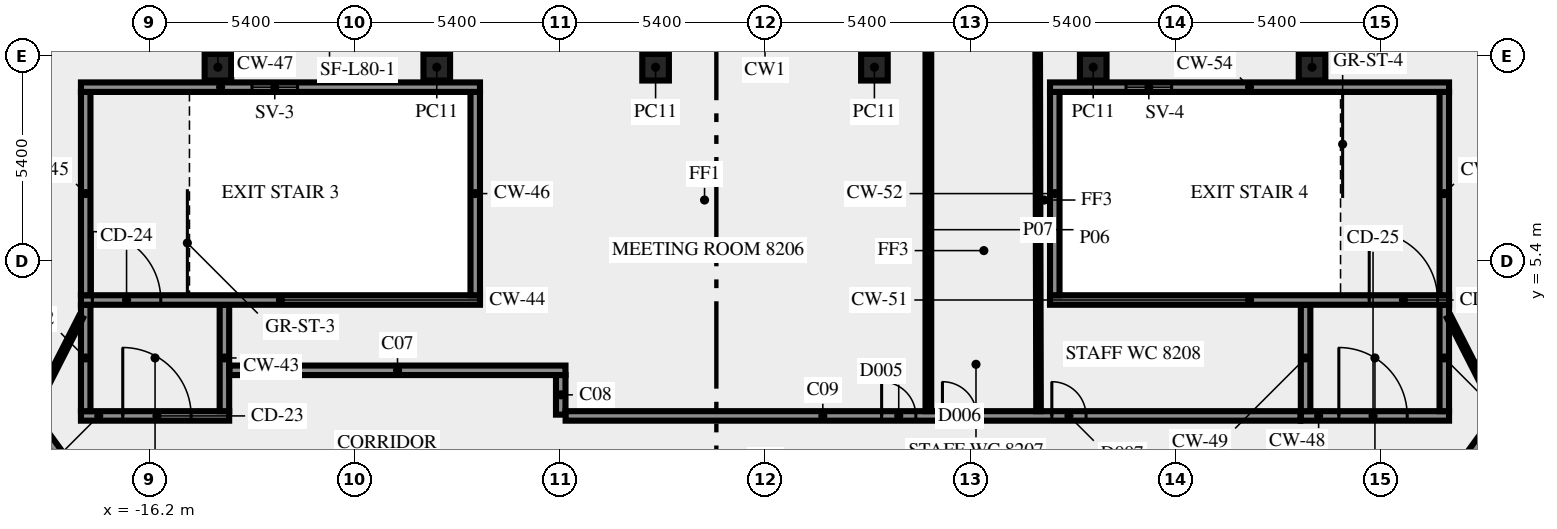
"""IFC4 building model, lengths in metres.
Left out: names, types, materials, properties, quantities, classifications, styles, units other than length and angle.
Written with IfcOpenShell. Run it as: python <this file> out.ifc"""

import sys

from ifc_helpers import new_model, si_unit, direction, frame, frame_2d, origin, origin_2d, place, context, subcontext, project, spatial, rectangle, extrude, element, fill, save


model = new_model("IFC4")
c1 = context("Model", 3, precision=1e-05, world=origin(), true_north=direction((0.0, 1.0)))
c2 = subcontext(c1, "Body", "Model", "MODEL_VIEW")
j1 = project(units=[si_unit("LENGTHUNIT", "METRE"), si_unit("PLANEANGLEUNIT", "RADIAN")], contexts=[c1])
p1 = place(None, origin())
s1 = spatial("IfcSite", under=j1, at=p1, CompositionType="ELEMENT")
p2 = place(p1, origin())
s2 = spatial("IfcBuilding", under=s1, at=p2, CompositionType="ELEMENT")
p3 = place(p2, frame((0.0, 0.0, 351.0)))
s3 = spatial("IfcBuildingStorey", under=s2, at=p3, CompositionType="ELEMENT", Elevation=351.0)
for number, where, z_axis, x_axis in (
    (1, (14.395, 10.5, 0.0), (0.0, 0.0, 1.0), (-1.0, 0.0, 0.0)),
    (2, (8.637, 10.5, 0.0), (0.0, 0.0, 1.0), (-1.0, 0.0, 0.0)),
    (3, (2.879, 10.5, 0.0), (0.0, 0.0, 1.0), (-1.0, 0.0, 0.0)),
    (4, (-2.879, 10.5, 0.0), (0.0, 0.0, 1.0), (-1.0, 0.0, 0.0)),
    (5, (-8.637, 10.5, 0.0), (0.0, 0.0, 1.0), (-1.0, 0.0, 0.0)),
    (6, (-14.395, 10.5, 0.0), (0.0, 0.0, 1.0), (-1.0, 0.0, 0.0)),
):
    element("IfcColumn", number, at=place(p3, frame(where, z_axis=z_axis, x_axis=x_axis)), inside=s3, PredefinedType="COLUMN", context=c2, shape_type="SweptSolid", body=[
        extrude(rectangle(XDim=0.7, YDim=0.7, at=origin_2d()), origin(), (0.0, 0.0, 1.0), 3.2),
    ])
p4 = place(p3, frame((-18.0, 1.325, 0.0), z_axis=(0.0, 0.0, 1.0), x_axis=(1.0, 0.0, 0.0)))
e7 = element("IfcWall", 7, at=p4, inside=s3, PredefinedType="SHEAR", context=c2, shape_type="SweptSolid", body=[
    extrude(rectangle(XDim=3.9, YDim=0.25, at=frame_2d((1.95, 0.0))), origin(), (0.0, 0.0, 1.0), 3.2),
])
p5 = place(p4, frame((1.1, 0.0, 0.0)))
e8 = element("IfcOpeningElement", 8, at=p5, cuts=e7, PredefinedType="OPENING", context=c2, shape_type="SweptSolid", body=[
    extrude(rectangle(XDim=1.8, YDim=2.1, at=frame_2d((0.9, 1.05))), frame((0.0, 0.135, 0.0), z_axis=(0.0, -1.0, 0.0), x_axis=(1.0, 0.0, 0.0)), (0.0, 0.0, 1.0), 0.27),
])
for number, where, z_axis, x_axis in (
    (9, (-17.875, 1.45, 0.0), (0.0, 0.0, 1.0), (0.0, 1.0, 0.0)),
    (10, (-14.225, 1.45, 0.0), (0.0, 0.0, 1.0), (0.0, 1.0, 0.0)),
):
    element("IfcWall", number, at=place(p3, frame(where, z_axis=z_axis, x_axis=x_axis)), inside=s3, PredefinedType="SHEAR", context=c2, shape_type="SweptSolid", body=[
        extrude(rectangle(XDim=2.8, YDim=0.25, at=frame_2d((1.4, 0.0))), origin(), (0.0, 0.0, 1.0), 3.2),
    ])
p6 = place(p3, frame((-18.0, 4.375, 0.0), z_axis=(0.0, 0.0, 1.0), x_axis=(1.0, 0.0, 0.0)))
e11 = element("IfcWall", 11, at=p6, inside=s3, PredefinedType="SHEAR", context=c2, shape_type="SweptSolid", body=[
    extrude(rectangle(XDim=10.5, YDim=0.25, at=frame_2d((5.25, 0.0))), origin(), (0.0, 0.0, 1.0), 3.2),
])
p7 = place(p6, frame((0.3, 0.0, 0.0)))
e12 = element("IfcOpeningElement", 12, at=p7, cuts=e11, PredefinedType="OPENING", context=c2, shape_type="SweptSolid", body=[
    extrude(rectangle(XDim=1.8, YDim=2.1, at=frame_2d((0.9, 1.05))), frame((0.0, 0.135, 0.0), z_axis=(0.0, -1.0, 0.0), x_axis=(1.0, 0.0, 0.0)), (0.0, 0.0, 1.0), 0.27),
])
for number, where, z_axis, x_axis in (
    (13, (-17.875, 4.5, 0.0), (0.0, 0.0, 1.0), (0.0, 1.0, 0.0)),
    (14, (-7.625, 4.5, 0.0), (0.0, 0.0, 1.0), (0.0, 1.0, 0.0)),
):
    element("IfcWall", number, at=place(p3, frame(where, z_axis=z_axis, x_axis=x_axis)), inside=s3, PredefinedType="SHEAR", context=c2, shape_type="SweptSolid", body=[
        extrude(rectangle(XDim=5.35, YDim=0.25, at=frame_2d((2.675, 0.0))), origin(), (0.0, 0.0, 1.0), 3.2),
    ])
p8 = place(p3, frame((-18.0, 9.975, 0.0), z_axis=(0.0, 0.0, 1.0), x_axis=(1.0, 0.0, 0.0)))
e15 = element("IfcWall", 15, at=p8, inside=s3, PredefinedType="SHEAR", context=c2, shape_type="SweptSolid", body=[
    extrude(rectangle(XDim=10.5, YDim=0.25, at=frame_2d((5.25, 0.0))), origin(), (0.0, 0.0, 1.0), 3.2),
])
p9 = place(p8, frame((4.5, 0.0, 1.0)))
e16 = element("IfcOpeningElement", 16, at=p9, cuts=e15, PredefinedType="OPENING", context=c2, shape_type="SweptSolid", body=[
    extrude(rectangle(XDim=1.2, YDim=1.2, at=frame_2d((0.6, 0.6))), frame((0.0, 0.135, 0.0), z_axis=(0.0, -1.0, 0.0), x_axis=(1.0, 0.0, 0.0)), (0.0, 0.0, 1.0), 0.27),
])
p10 = place(p3, frame((14.1, 1.325, 0.0), z_axis=(0.0, 0.0, 1.0), x_axis=(1.0, 0.0, 0.0)))
e17 = element("IfcWall", 17, at=p10, inside=s3, PredefinedType="SHEAR", context=c2, shape_type="SweptSolid", body=[
    extrude(rectangle(XDim=3.9, YDim=0.25, at=frame_2d((1.95, 0.0))), origin(), (0.0, 0.0, 1.0), 3.2),
])
p11 = place(p10, frame((1.0, 0.0, 0.0)))
e18 = element("IfcOpeningElement", 18, at=p11, cuts=e17, PredefinedType="OPENING", context=c2, shape_type="SweptSolid", body=[
    extrude(rectangle(XDim=1.8, YDim=2.1, at=frame_2d((0.9, 1.05))), frame((0.0, 0.135, 0.0), z_axis=(0.0, -1.0, 0.0), x_axis=(1.0, 0.0, 0.0)), (0.0, 0.0, 1.0), 0.27),
])
for number, where, z_axis, x_axis in (
    (19, (14.225, 1.45, 0.0), (0.0, 0.0, 1.0), (0.0, 1.0, 0.0)),
    (20, (17.875, 1.45, 0.0), (0.0, 0.0, 1.0), (0.0, 1.0, 0.0)),
):
    element("IfcWall", number, at=place(p3, frame(where, z_axis=z_axis, x_axis=x_axis)), inside=s3, PredefinedType="SHEAR", context=c2, shape_type="SweptSolid", body=[
        extrude(rectangle(XDim=2.8, YDim=0.25, at=frame_2d((1.4, 0.0))), origin(), (0.0, 0.0, 1.0), 3.2),
    ])
p12 = place(p3, frame((7.5, 4.375, 0.0), z_axis=(0.0, 0.0, 1.0), x_axis=(1.0, 0.0, 0.0)))
e21 = element("IfcWall", 21, at=p12, inside=s3, PredefinedType="SHEAR", context=c2, shape_type="SweptSolid", body=[
    extrude(rectangle(XDim=10.5, YDim=0.25, at=frame_2d((5.25, 0.0))), origin(), (0.0, 0.0, 1.0), 3.2),
])
p13 = place(p12, frame((8.4, 0.0, 0.0)))
e22 = element("IfcOpeningElement", 22, at=p13, cuts=e21, PredefinedType="OPENING", context=c2, shape_type="SweptSolid", body=[
    extrude(rectangle(XDim=1.8, YDim=2.1, at=frame_2d((0.9, 1.05))), frame((0.0, 0.135, 0.0), z_axis=(0.0, -1.0, 0.0), x_axis=(1.0, 0.0, 0.0)), (0.0, 0.0, 1.0), 0.27),
])
for number, where, z_axis, x_axis in (
    (23, (7.625, 4.5, 0.0), (0.0, 0.0, 1.0), (0.0, 1.0, 0.0)),
    (24, (17.875, 4.5, 0.0), (0.0, 0.0, 1.0), (0.0, 1.0, 0.0)),
):
    element("IfcWall", number, at=place(p3, frame(where, z_axis=z_axis, x_axis=x_axis)), inside=s3, PredefinedType="SHEAR", context=c2, shape_type="SweptSolid", body=[
        extrude(rectangle(XDim=5.35, YDim=0.25, at=frame_2d((2.675, 0.0))), origin(), (0.0, 0.0, 1.0), 3.2),
    ])
p14 = place(p3, frame((7.5, 9.975, 0.0), z_axis=(0.0, 0.0, 1.0), x_axis=(1.0, 0.0, 0.0)))
e25 = element("IfcWall", 25, at=p14, inside=s3, PredefinedType="SHEAR", context=c2, shape_type="SweptSolid", body=[
    extrude(rectangle(XDim=10.5, YDim=0.25, at=frame_2d((5.25, 0.0))), origin(), (0.0, 0.0, 1.0), 3.2),
])
p15 = place(p14, frame((2.0, 0.0, 1.0)))
e26 = element("IfcOpeningElement", 26, at=p15, cuts=e25, PredefinedType="OPENING", context=c2, shape_type="SweptSolid", body=[
    extrude(rectangle(XDim=1.2, YDim=1.2, at=frame_2d((0.6, 0.6))), frame((0.0, 0.135, 0.0), z_axis=(0.0, -1.0, 0.0), x_axis=(1.0, 0.0, 0.0)), (0.0, 0.0, 1.0), 0.27),
])
p16 = place(p3, frame((17.545, -1.125, 0.0), z_axis=(0.0, 0.0, 1.0), x_axis=(0.58779555165, 0.809009511354, 0.0)))
e27 = element("IfcWall", 27, at=p16, inside=s3, PredefinedType="SOLIDWALL", context=c2, shape_type="SweptSolid", body=[
    extrude(rectangle(XDim=18.103, YDim=0.25, at=frame_2d((9.052, 0.0))), origin(), (0.0, 0.0, 1.0), 3.2),
])
p17 = place(p16, frame((16.728, 0.0, 0.0)))
e28 = element("IfcOpeningElement", 28, at=p17, cuts=e27, PredefinedType="OPENING", context=c2, shape_type="SweptSolid", body=[
    extrude(rectangle(XDim=0.9, YDim=2.1, at=frame_2d((0.45, 1.05))), frame((0.0, 0.135, 0.0), z_axis=(0.0, -1.0, 0.0), x_axis=(1.0, 0.0, 0.0)), (0.0, 0.0, 1.0), 0.27),
])
p18 = place(p3, frame((-28.039, 13.319, 0.0), z_axis=(0.0, 0.0, 1.0), x_axis=(0.587791911753, -0.809012155952, 0.0)))
e29 = element("IfcWall", 29, at=p18, inside=s3, PredefinedType="SOLIDWALL", context=c2, shape_type="SweptSolid", body=[
    extrude(rectangle(XDim=17.853, YDim=0.25, at=frame_2d((8.927, 0.0))), origin(), (0.0, 0.0, 1.0), 3.2),
])
p19 = place(p18, frame((13.512, 0.0, 0.0)))
e30 = element("IfcOpeningElement", 30, at=p19, cuts=e29, PredefinedType="OPENING", context=c2, shape_type="SweptSolid", body=[
    extrude(rectangle(XDim=0.9, YDim=2.1, at=frame_2d((0.45, 1.05))), frame((0.0, 0.135, 0.0), z_axis=(0.0, -1.0, 0.0), x_axis=(1.0, 0.0, 0.0)), (0.0, 0.0, 1.0), 0.27),
])
p20 = place(p3, frame((-14.09, 2.525, 0.0), z_axis=(0.0, 0.0, 1.0), x_axis=(1.0, 0.0, 0.0)))
e31 = element("IfcWall", 31, at=p20, inside=s3, PredefinedType="SOLIDWALL", context=c2, shape_type="SweptSolid", body=[
    extrude(rectangle(XDim=8.84, YDim=0.25, at=frame_2d((4.42, 0.0))), origin(), (0.0, 0.0, 1.0), 3.2),
])
p21 = place(p3, frame((-5.375, 2.4, 0.0), z_axis=(0.0, 0.0, 1.0), x_axis=(0.0, -1.0, 0.0)))
e32 = element("IfcWall", 32, at=p21, inside=s3, PredefinedType="SOLIDWALL", context=c2, shape_type="SweptSolid", body=[
    extrude(rectangle(XDim=1.041, YDim=0.25, at=frame_2d((0.521, 0.0))), origin(), (0.0, 0.0, 1.0), 3.2),
])
p22 = place(p3, frame((-5.246, 1.325, 0.0), z_axis=(0.0, 0.0, 1.0), x_axis=(1.0, 0.0, 0.0)))
e33 = element("IfcWall", 33, at=p22, inside=s3, PredefinedType="SOLIDWALL", context=c2, shape_type="SweptSolid", body=[
    extrude(rectangle(XDim=19.336, YDim=0.25, at=frame_2d((9.668, 0.0))), origin(), (0.0, 0.0, 1.0), 3.2),
])
p23 = place(p22, frame((8.315, 0.0, 0.0)))
e34 = element("IfcOpeningElement", 34, at=p23, cuts=e33, PredefinedType="OPENING", context=c2, shape_type="SweptSolid", body=[
    extrude(rectangle(XDim=0.9, YDim=2.1, at=frame_2d((0.45, 1.05))), frame((0.0, 0.135, 0.0), z_axis=(0.0, -1.0, 0.0), x_axis=(1.0, 0.0, 0.0)), (0.0, 0.0, 1.0), 0.27),
])
p24 = place(p22, frame((9.915, 0.0, 0.0)))
e35 = element("IfcOpeningElement", 35, at=p24, cuts=e33, PredefinedType="OPENING", context=c2, shape_type="SweptSolid", body=[
    extrude(rectangle(XDim=0.9, YDim=2.1, at=frame_2d((0.45, 1.05))), frame((0.0, 0.135, 0.0), z_axis=(0.0, -1.0, 0.0), x_axis=(1.0, 0.0, 0.0)), (0.0, 0.0, 1.0), 0.27),
])
p25 = place(p22, frame((12.794, 0.0, 0.0)))
e36 = element("IfcOpeningElement", 36, at=p25, cuts=e33, PredefinedType="OPENING", context=c2, shape_type="SweptSolid", body=[
    extrude(rectangle(XDim=0.9, YDim=2.1, at=frame_2d((0.45, 1.05))), frame((0.0, 0.135, 0.0), z_axis=(0.0, -1.0, 0.0), x_axis=(1.0, 0.0, 0.0)), (0.0, 0.0, 1.0), 0.27),
])
p26 = place(p3, frame((4.299, 1.45, 0.0), z_axis=(0.0, 0.0, 1.0), x_axis=(0.0, 1.0, 0.0)))
e37 = element("IfcWall", 37, at=p26, inside=s3, PredefinedType="PARTITIONING", context=c2, shape_type="SweptSolid", body=[
    extrude(rectangle(XDim=9.55, YDim=0.15, at=frame_2d((4.775, 0.0))), origin(), (0.0, 0.0, 1.0), 2.5),
])
p27 = place(p3, frame((7.198, 1.45, 0.0), z_axis=(0.0, 0.0, 1.0), x_axis=(-0.002377476217, 0.999997173799, 0.0)))
e38 = element("IfcWall", 38, at=p27, inside=s3, PredefinedType="PARTITIONING", context=c2, shape_type="SweptSolid", body=[
    extrude(rectangle(XDim=9.55, YDim=0.12, at=frame_2d((4.775, 0.0))), origin(), (0.0, 0.0, 1.0), 2.5),
])
for number, where, z_axis, x_axis in (
    (39, (18.0, 3.925, 0.0), (0.0, 0.0, 1.0), (0.454, -0.891, 0.0)),
    (40, (-19.261, 1.45, 0.0), (0.0, 0.0, 1.0), (0.454, 0.891, 0.0)),
):
    element("IfcWall", number, at=place(p3, frame(where, z_axis=z_axis, x_axis=x_axis)), inside=s3, PredefinedType="PARTITIONING", context=c2, shape_type="SweptSolid", body=[
        extrude(rectangle(XDim=2.778, YDim=0.12, at=frame_2d((1.389, 0.0))), origin(), (0.0, 0.0, 1.0), 3.2),
    ])
p28 = place(p5, origin())
e41 = element("IfcDoor", 41, at=p28, inside=s3, OperationType="DOUBLE_DOOR_SINGLE_SWING", PredefinedType="DOOR", context=c2, shape_type="SweptSolid", body=[
    extrude(rectangle(XDim=1.8, YDim=2.1, at=frame_2d((0.9, 1.05))), frame((0.0, 0.025, 0.0), z_axis=(0.0, -1.0, 0.0), x_axis=(1.0, 0.0, 0.0)), (0.0, 0.0, 1.0), 0.05),
])
fill(e8, e41)
p29 = place(p7, origin())
e42 = element("IfcDoor", 42, at=p29, inside=s3, OperationType="DOUBLE_DOOR_SINGLE_SWING", PredefinedType="DOOR", context=c2, shape_type="SweptSolid", body=[
    extrude(rectangle(XDim=1.8, YDim=2.1, at=frame_2d((0.9, 1.05))), frame((0.0, 0.025, 0.0), z_axis=(0.0, -1.0, 0.0), x_axis=(1.0, 0.0, 0.0)), (0.0, 0.0, 1.0), 0.05),
])
fill(e12, e42)
p30 = place(p9, origin())
e43 = element("IfcWindow", 43, at=p30, inside=s3, PartitioningType="SINGLE_PANEL", PredefinedType="WINDOW", context=c2, shape_type="SweptSolid", body=[
    extrude(rectangle(XDim=1.2, YDim=1.2, at=frame_2d((0.6, 0.6))), frame((0.0, 0.03, 0.0), z_axis=(0.0, -1.0, 0.0), x_axis=(1.0, 0.0, 0.0)), (0.0, 0.0, 1.0), 0.06),
])
fill(e16, e43)
p31 = place(p11, origin())
e44 = element("IfcDoor", 44, at=p31, inside=s3, OperationType="DOUBLE_DOOR_SINGLE_SWING", PredefinedType="DOOR", context=c2, shape_type="SweptSolid", body=[
    extrude(rectangle(XDim=1.8, YDim=2.1, at=frame_2d((0.9, 1.05))), frame((0.0, 0.025, 0.0), z_axis=(0.0, -1.0, 0.0), x_axis=(1.0, 0.0, 0.0)), (0.0, 0.0, 1.0), 0.05),
])
fill(e18, e44)
p32 = place(p13, origin())
e45 = element("IfcDoor", 45, at=p32, inside=s3, OperationType="DOUBLE_DOOR_SINGLE_SWING", PredefinedType="DOOR", context=c2, shape_type="SweptSolid", body=[
    extrude(rectangle(XDim=1.8, YDim=2.1, at=frame_2d((0.9, 1.05))), frame((0.0, 0.025, 0.0), z_axis=(0.0, -1.0, 0.0), x_axis=(1.0, 0.0, 0.0)), (0.0, 0.0, 1.0), 0.05),
])
fill(e22, e45)
p33 = place(p15, origin())
e46 = element("IfcWindow", 46, at=p33, inside=s3, PartitioningType="SINGLE_PANEL", PredefinedType="WINDOW", context=c2, shape_type="SweptSolid", body=[
    extrude(rectangle(XDim=1.2, YDim=1.2, at=frame_2d((0.6, 0.6))), frame((0.0, 0.03, 0.0), z_axis=(0.0, -1.0, 0.0), x_axis=(1.0, 0.0, 0.0)), (0.0, 0.0, 1.0), 0.06),
])
fill(e26, e46)
p34 = place(p23, origin())
e47 = element("IfcDoor", 47, at=p34, inside=s3, OperationType="SINGLE_SWING_RIGHT", PredefinedType="DOOR", context=c2, shape_type="SweptSolid", body=[
    extrude(rectangle(XDim=0.9, YDim=2.1, at=frame_2d((0.45, 1.05))), frame((0.0, 0.025, 0.0), z_axis=(0.0, -1.0, 0.0), x_axis=(1.0, 0.0, 0.0)), (0.0, 0.0, 1.0), 0.05),
])
fill(e34, e47)
p35 = place(p24, origin())
e48 = element("IfcDoor", 48, at=p35, inside=s3, OperationType="SINGLE_SWING_LEFT", PredefinedType="DOOR", context=c2, shape_type="SweptSolid", body=[
    extrude(rectangle(XDim=0.9, YDim=2.1, at=frame_2d((0.45, 1.05))), frame((0.0, 0.025, 0.0), z_axis=(0.0, -1.0, 0.0), x_axis=(1.0, 0.0, 0.0)), (0.0, 0.0, 1.0), 0.05),
])
fill(e35, e48)
p36 = place(p25, origin())
e49 = element("IfcDoor", 49, at=p36, inside=s3, OperationType="SINGLE_SWING_LEFT", PredefinedType="DOOR", context=c2, shape_type="SweptSolid", body=[
    extrude(rectangle(XDim=0.9, YDim=2.1, at=frame_2d((0.45, 1.05))), frame((0.0, 0.025, 0.0), z_axis=(0.0, -1.0, 0.0), x_axis=(1.0, 0.0, 0.0)), (0.0, 0.0, 1.0), 0.05),
])
fill(e36, e49)
save(model, sys.argv[1])
